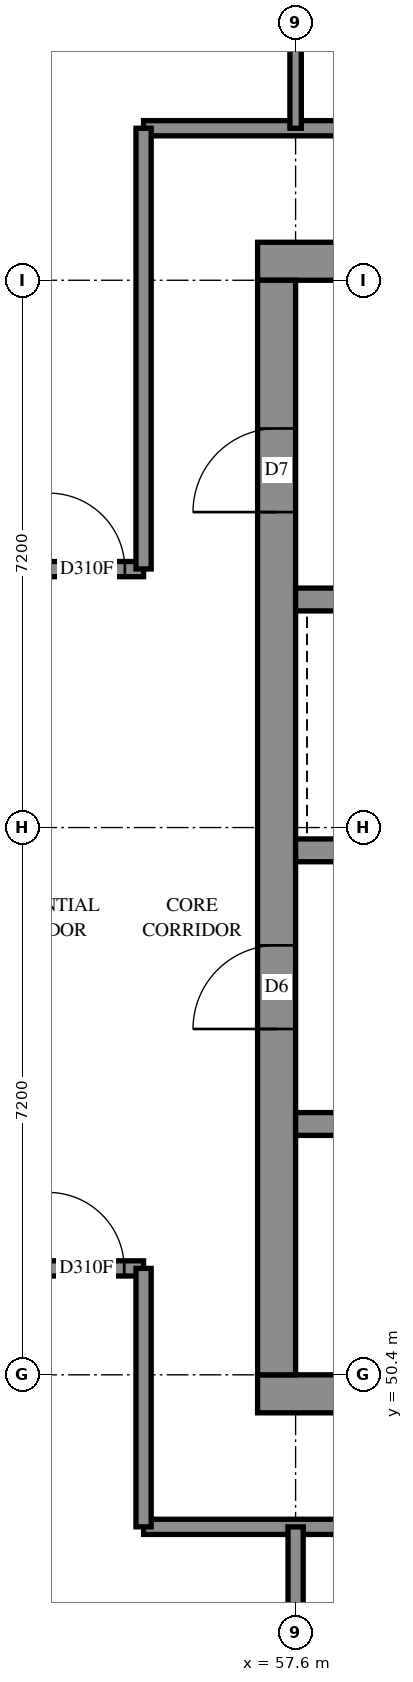
"""IFC4 building model, lengths in metres.
Left out: names, types, materials, properties, quantities, classifications, styles, units other than length and angle.
Written with IfcOpenShell. Run it as: python <this file> out.ifc"""

import sys

from ifc_helpers import new_model, si_unit, direction, frame, frame_2d, origin, place, context, subcontext, project, spatial, rectangle, extrude, element, fill, save


model = new_model("IFC4")
c1 = context("Model", 3, precision=1e-05, world=origin(), true_north=direction((0.0, 1.0)))
c2 = subcontext(c1, "Body", "Model", "MODEL_VIEW")
j1 = project(units=[si_unit("LENGTHUNIT", "METRE"), si_unit("PLANEANGLEUNIT", "RADIAN")], contexts=[c1])
p1 = place(None, origin())
s1 = spatial("IfcSite", under=j1, at=p1, CompositionType="ELEMENT")
p2 = place(p1, origin())
s2 = spatial("IfcBuilding", under=s1, at=p2, CompositionType="ELEMENT")
p3 = place(p2, frame((0.0, 0.0, 227.0)))
s3 = spatial("IfcBuildingStorey", under=s2, at=p3, CompositionType="ELEMENT", Elevation=227.0)
p4 = place(p3, frame((57.1, 50.15, -0.3), z_axis=(0.0, 0.0, 1.0), x_axis=(1.0, 0.0, 0.0)))
e1 = element("IfcWall", 1, at=p4, inside=s3, PredefinedType="SHEAR", context=c2, shape_type="SweptSolid", body=[
    extrude(rectangle(XDim=15.4, YDim=0.5, at=frame_2d((7.7, 0.0))), origin(), (0.0, 0.0, 1.0), 2.7),
])
p5 = place(p3, frame((57.1, 65.05, -0.3), z_axis=(0.0, 0.0, 1.0), x_axis=(1.0, 0.0, 0.0)))
e2 = element("IfcWall", 2, at=p5, inside=s3, PredefinedType="SHEAR", context=c2, shape_type="SweptSolid", body=[
    extrude(rectangle(XDim=15.4, YDim=0.5, at=frame_2d((7.7, 0.0))), origin(), (0.0, 0.0, 1.0), 2.7),
])
p6 = place(p5, frame((10.5, 0.0, 0.3)))
e3 = element("IfcOpeningElement", 3, at=p6, cuts=e2, PredefinedType="OPENING", context=c2, shape_type="SweptSolid", body=[
    extrude(rectangle(XDim=0.8, YDim=2.1, at=frame_2d((0.4, 1.05))), frame((0.0, 0.26, 0.0), z_axis=(0.0, -1.0, 0.0), x_axis=(1.0, 0.0, 0.0)), (0.0, 0.0, 1.0), 0.52),
])
p7 = place(p3, frame((57.35, 50.4, -0.3), z_axis=(0.0, 0.0, 1.0), x_axis=(0.0, 1.0, 0.0)))
e4 = element("IfcWall", 4, at=p7, inside=s3, PredefinedType="SHEAR", context=c2, shape_type="SweptSolid", body=[
    extrude(rectangle(XDim=14.4, YDim=0.5, at=frame_2d((7.2, 0.0))), origin(), (0.0, 0.0, 1.0), 2.7),
])
p8 = place(p7, frame((4.55, 0.0, 0.3)))
e5 = element("IfcOpeningElement", 5, at=p8, cuts=e4, PredefinedType="OPENING", context=c2, shape_type="SweptSolid", body=[
    extrude(rectangle(XDim=1.1, YDim=2.1, at=frame_2d((0.55, 1.05))), frame((0.0, 0.26, 0.0), z_axis=(0.0, -1.0, 0.0), x_axis=(1.0, 0.0, 0.0)), (0.0, 0.0, 1.0), 0.52),
])
p9 = place(p7, frame((11.35, 0.0, 0.3)))
e6 = element("IfcOpeningElement", 6, at=p9, cuts=e4, PredefinedType="OPENING", context=c2, shape_type="SweptSolid", body=[
    extrude(rectangle(XDim=1.1, YDim=2.1, at=frame_2d((0.55, 1.05))), frame((0.0, 0.26, 0.0), z_axis=(0.0, -1.0, 0.0), x_axis=(1.0, 0.0, 0.0)), (0.0, 0.0, 1.0), 0.52),
])
p10 = place(p3, frame((57.6, 53.7, 0.0), z_axis=(0.0, 0.0, 1.0), x_axis=(1.0, 0.0, 0.0)))
e7 = element("IfcWall", 7, at=p10, inside=s3, PredefinedType="SOLIDWALL", context=c2, shape_type="SweptSolid", body=[
    extrude(rectangle(XDim=14.4, YDim=0.3, at=frame_2d((7.2, 0.0))), origin(), (0.0, 0.0, 1.0), 3.1),
])
p11 = place(p10, frame((1.35, 0.0, 0.0)))
e8 = element("IfcOpeningElement", 8, at=p11, cuts=e7, PredefinedType="OPENING", context=c2, shape_type="SweptSolid", body=[
    extrude(rectangle(XDim=0.9, YDim=2.1, at=frame_2d((0.45, 1.05))), frame((0.0, 0.16, 0.0), z_axis=(0.0, -1.0, 0.0), x_axis=(1.0, 0.0, 0.0)), (0.0, 0.0, 1.0), 0.32),
])
p12 = place(p10, frame((4.95, 0.0, 0.0)))
e9 = element("IfcOpeningElement", 9, at=p12, cuts=e7, PredefinedType="OPENING", context=c2, shape_type="SweptSolid", body=[
    extrude(rectangle(XDim=0.9, YDim=2.1, at=frame_2d((0.45, 1.05))), frame((0.0, 0.16, 0.0), z_axis=(0.0, -1.0, 0.0), x_axis=(1.0, 0.0, 0.0)), (0.0, 0.0, 1.0), 0.32),
])
p13 = place(p10, frame((8.55, 0.0, 0.0)))
e10 = element("IfcOpeningElement", 10, at=p13, cuts=e7, PredefinedType="OPENING", context=c2, shape_type="SweptSolid", body=[
    extrude(rectangle(XDim=0.9, YDim=2.1, at=frame_2d((0.45, 1.05))), frame((0.0, 0.16, 0.0), z_axis=(0.0, -1.0, 0.0), x_axis=(1.0, 0.0, 0.0)), (0.0, 0.0, 1.0), 0.32),
])
p14 = place(p10, frame((12.05, 0.0, 0.0)))
e11 = element("IfcOpeningElement", 11, at=p14, cuts=e7, PredefinedType="OPENING", context=c2, shape_type="SweptSolid", body=[
    extrude(rectangle(XDim=1.1, YDim=2.1, at=frame_2d((0.55, 1.05))), frame((0.0, 0.16, 0.0), z_axis=(0.0, -1.0, 0.0), x_axis=(1.0, 0.0, 0.0)), (0.0, 0.0, 1.0), 0.32),
])
p15 = place(p3, frame((57.6, 57.3, 0.0), z_axis=(0.0, 0.0, 1.0), x_axis=(1.0, 0.0, 0.0)))
e12 = element("IfcWall", 12, at=p15, inside=s3, PredefinedType="SOLIDWALL", context=c2, shape_type="SweptSolid", body=[
    extrude(rectangle(XDim=14.4, YDim=0.3, at=frame_2d((7.2, 0.0))), origin(), (0.0, 0.0, 1.0), 3.1),
])
p16 = place(p15, frame((1.25, 0.0, 0.0)))
e13 = element("IfcOpeningElement", 13, at=p16, cuts=e12, PredefinedType="OPENING", context=c2, shape_type="SweptSolid", body=[
    extrude(rectangle(XDim=1.1, YDim=2.1, at=frame_2d((0.55, 1.05))), frame((0.0, 0.16, 0.0), z_axis=(0.0, -1.0, 0.0), x_axis=(1.0, 0.0, 0.0)), (0.0, 0.0, 1.0), 0.32),
])
p17 = place(p15, frame((4.85, 0.0, 0.0)))
e14 = element("IfcOpeningElement", 14, at=p17, cuts=e12, PredefinedType="OPENING", context=c2, shape_type="SweptSolid", body=[
    extrude(rectangle(XDim=1.1, YDim=2.1, at=frame_2d((0.55, 1.05))), frame((0.0, 0.16, 0.0), z_axis=(0.0, -1.0, 0.0), x_axis=(1.0, 0.0, 0.0)), (0.0, 0.0, 1.0), 0.32),
])
p18 = place(p15, frame((8.45, 0.0, 0.0)))
e15 = element("IfcOpeningElement", 15, at=p18, cuts=e12, PredefinedType="OPENING", context=c2, shape_type="SweptSolid", body=[
    extrude(rectangle(XDim=1.1, YDim=2.1, at=frame_2d((0.55, 1.05))), frame((0.0, 0.16, 0.0), z_axis=(0.0, -1.0, 0.0), x_axis=(1.0, 0.0, 0.0)), (0.0, 0.0, 1.0), 0.32),
])
p19 = place(p15, frame((12.05, 0.0, 0.0)))
e16 = element("IfcOpeningElement", 16, at=p19, cuts=e12, PredefinedType="OPENING", context=c2, shape_type="SweptSolid", body=[
    extrude(rectangle(XDim=1.1, YDim=2.1, at=frame_2d((0.55, 1.05))), frame((0.0, 0.16, 0.0), z_axis=(0.0, -1.0, 0.0), x_axis=(1.0, 0.0, 0.0)), (0.0, 0.0, 1.0), 0.32),
])
p20 = place(p3, frame((57.6, 60.6, 0.0), z_axis=(0.0, 0.0, 1.0), x_axis=(1.0, 0.0, 0.0)))
e17 = element("IfcWall", 17, at=p20, inside=s3, PredefinedType="SOLIDWALL", context=c2, shape_type="SweptSolid", body=[
    extrude(rectangle(XDim=7.2, YDim=0.3, at=frame_2d((3.6, 0.0))), origin(), (0.0, 0.0, 1.0), 3.1),
])
p21 = place(p3, frame((55.6, 48.4, 0.0), z_axis=(0.0, 0.0, 1.0), x_axis=(1.0, 0.0, 0.0)))
e18 = element("IfcWall", 18, at=p21, inside=s3, PredefinedType="PARTITIONING", context=c2, shape_type="SweptSolid", body=[
    extrude(rectangle(XDim=18.4, YDim=0.2, at=frame_2d((9.2, 0.0))), origin(), (0.0, 0.0, 1.0), 3.1),
])
p22 = place(p21, frame((5.862, 0.0, 0.0)))
e19 = element("IfcOpeningElement", 19, at=p22, cuts=e18, PredefinedType="OPENING", context=c2, shape_type="SweptSolid", body=[
    extrude(rectangle(XDim=1.0, YDim=2.1, at=frame_2d((0.5, 1.05))), frame((0.0, 0.11, 0.0), z_axis=(0.0, -1.0, 0.0), x_axis=(1.0, 0.0, 0.0)), (0.0, 0.0, 1.0), 0.22),
])
p23 = place(p21, frame((13.061, 0.0, 0.0)))
e20 = element("IfcOpeningElement", 20, at=p23, cuts=e18, PredefinedType="OPENING", context=c2, shape_type="SweptSolid", body=[
    extrude(rectangle(XDim=0.9, YDim=2.1, at=frame_2d((0.45, 1.05))), frame((0.0, 0.11, 0.0), z_axis=(0.0, -1.0, 0.0), x_axis=(1.0, 0.0, 0.0)), (0.0, 0.0, 1.0), 0.22),
])
p24 = place(p3, frame((55.6, 66.8, 0.0), z_axis=(0.0, 0.0, 1.0), x_axis=(1.0, 0.0, 0.0)))
e21 = element("IfcWall", 21, at=p24, inside=s3, PredefinedType="PARTITIONING", context=c2, shape_type="SweptSolid", body=[
    extrude(rectangle(XDim=18.4, YDim=0.2, at=frame_2d((9.2, 0.0))), origin(), (0.0, 0.0, 1.0), 3.1),
])
p25 = place(p24, frame((4.3, 0.0, 0.0)))
e22 = element("IfcOpeningElement", 22, at=p25, cuts=e21, PredefinedType="OPENING", context=c2, shape_type="SweptSolid", body=[
    extrude(rectangle(XDim=0.9, YDim=2.1, at=frame_2d((0.45, 1.05))), frame((0.0, 0.11, 0.0), z_axis=(0.0, -1.0, 0.0), x_axis=(1.0, 0.0, 0.0)), (0.0, 0.0, 1.0), 0.22),
])
p26 = place(p24, frame((6.0, 0.0, 0.0)))
e23 = element("IfcOpeningElement", 23, at=p26, cuts=e21, PredefinedType="OPENING", context=c2, shape_type="SweptSolid", body=[
    extrude(rectangle(XDim=0.9, YDim=2.1, at=frame_2d((0.45, 1.05))), frame((0.0, 0.11, 0.0), z_axis=(0.0, -1.0, 0.0), x_axis=(1.0, 0.0, 0.0)), (0.0, 0.0, 1.0), 0.22),
])
p27 = place(p24, frame((13.367, 0.0, 0.0)))
e24 = element("IfcOpeningElement", 24, at=p27, cuts=e21, PredefinedType="OPENING", context=c2, shape_type="SweptSolid", body=[
    extrude(rectangle(XDim=1.0, YDim=2.1, at=frame_2d((0.5, 1.05))), frame((0.0, 0.11, 0.0), z_axis=(0.0, -1.0, 0.0), x_axis=(1.0, 0.0, 0.0)), (0.0, 0.0, 1.0), 0.22),
])
p28 = place(p3, frame((40.602, 61.0, 0.0), z_axis=(0.0, 0.0, 1.0), x_axis=(1.0, 0.0, 0.0)))
e25 = element("IfcWall", 25, at=p28, inside=s3, PredefinedType="PARTITIONING", context=c2, shape_type="SweptSolid", body=[
    extrude(rectangle(XDim=14.998, YDim=0.2, at=frame_2d((7.499, 0.0))), origin(), (0.0, 0.0, 1.0), 3.1),
])
p29 = place(p28, frame((1.306, 0.0, 0.0)))
e26 = element("IfcOpeningElement", 26, at=p29, cuts=e25, PredefinedType="OPENING", context=c2, shape_type="SweptSolid", body=[
    extrude(rectangle(XDim=0.9, YDim=2.1, at=frame_2d((0.45, 1.05))), frame((0.0, 0.11, 0.0), z_axis=(0.0, -1.0, 0.0), x_axis=(1.0, 0.0, 0.0)), (0.0, 0.0, 1.0), 0.22),
])
p30 = place(p28, frame((6.598, 0.0, 0.0)))
e27 = element("IfcOpeningElement", 27, at=p30, cuts=e25, PredefinedType="OPENING", context=c2, shape_type="SweptSolid", body=[
    extrude(rectangle(XDim=0.9, YDim=2.1, at=frame_2d((0.45, 1.05))), frame((0.0, 0.11, 0.0), z_axis=(0.0, -1.0, 0.0), x_axis=(1.0, 0.0, 0.0)), (0.0, 0.0, 1.0), 0.22),
])
p31 = place(p28, frame((12.098, 0.0, 0.0)))
e28 = element("IfcOpeningElement", 28, at=p31, cuts=e25, PredefinedType="OPENING", context=c2, shape_type="SweptSolid", body=[
    extrude(rectangle(XDim=0.9, YDim=2.1, at=frame_2d((0.45, 1.05))), frame((0.0, 0.11, 0.0), z_axis=(0.0, -1.0, 0.0), x_axis=(1.0, 0.0, 0.0)), (0.0, 0.0, 1.0), 0.22),
])
p32 = place(p28, frame((13.752, 0.0, 0.0)))
e29 = element("IfcOpeningElement", 29, at=p32, cuts=e25, PredefinedType="OPENING", context=c2, shape_type="SweptSolid", body=[
    extrude(rectangle(XDim=1.0, YDim=2.1, at=frame_2d((0.5, 1.05))), frame((0.0, 0.11, 0.0), z_axis=(0.0, -1.0, 0.0), x_axis=(1.0, 0.0, 0.0)), (0.0, 0.0, 1.0), 0.22),
])
p33 = place(p3, frame((55.6, 61.002, 0.0), z_axis=(0.0, 0.0, 1.0), x_axis=(0.0, 1.0, 0.0)))
e30 = element("IfcWall", 30, at=p33, inside=s3, PredefinedType="PARTITIONING", context=c2, shape_type="SweptSolid", body=[
    extrude(rectangle(XDim=5.798, YDim=0.2, at=frame_2d((2.899, 0.0))), origin(), (0.0, 0.0, 1.0), 3.1),
])
p34 = place(p3, frame((50.4, 51.8, 0.0), z_axis=(0.0, 0.0, 1.0), x_axis=(1.0, 0.0, 0.0)))
e31 = element("IfcWall", 31, at=p34, inside=s3, PredefinedType="PARTITIONING", context=c2, shape_type="SweptSolid", body=[
    extrude(rectangle(XDim=5.2, YDim=0.2, at=frame_2d((2.6, 0.0))), origin(), (0.0, 0.0, 1.0), 3.1),
])
p35 = place(p34, frame((0.4, 0.0, 0.0)))
e32 = element("IfcOpeningElement", 32, at=p35, cuts=e31, PredefinedType="OPENING", context=c2, shape_type="SweptSolid", body=[
    extrude(rectangle(XDim=0.9, YDim=2.1, at=frame_2d((0.45, 1.05))), frame((0.0, 0.11, 0.0), z_axis=(0.0, -1.0, 0.0), x_axis=(1.0, 0.0, 0.0)), (0.0, 0.0, 1.0), 0.22),
])
p36 = place(p34, frame((3.946, 0.0, 0.0)))
e33 = element("IfcOpeningElement", 33, at=p36, cuts=e31, PredefinedType="OPENING", context=c2, shape_type="SweptSolid", body=[
    extrude(rectangle(XDim=1.0, YDim=2.1, at=frame_2d((0.5, 1.05))), frame((0.0, 0.11, 0.0), z_axis=(0.0, -1.0, 0.0), x_axis=(1.0, 0.0, 0.0)), (0.0, 0.0, 1.0), 0.22),
])
p37 = place(p3, frame((57.6, 43.6, 0.0), z_axis=(0.0, 0.0, 1.0), x_axis=(0.0, 1.0, 0.0)))
e34 = element("IfcWall", 34, at=p37, inside=s3, PredefinedType="PARTITIONING", context=c2, shape_type="SweptSolid", body=[
    extrude(rectangle(XDim=4.8, YDim=0.2, at=frame_2d((2.4, 0.0))), origin(), (0.0, 0.0, 1.0), 3.1),
])
p38 = place(p3, frame((55.6, 48.4, 0.0), z_axis=(0.0, 0.0, 1.0), x_axis=(0.0, 1.0, 0.0)))
e35 = element("IfcWall", 35, at=p38, inside=s3, PredefinedType="PARTITIONING", context=c2, shape_type="SweptSolid", body=[
    extrude(rectangle(XDim=3.4, YDim=0.2, at=frame_2d((1.7, 0.0))), origin(), (0.0, 0.0, 1.0), 3.1),
])
p39 = place(p3, frame((57.6, 66.8, 0.0), z_axis=(0.0, 0.0, 1.0), x_axis=(0.0, 1.0, 0.0)))
e36 = element("IfcWall", 36, at=p39, inside=s3, PredefinedType="PARTITIONING", context=c2, shape_type="SweptSolid", body=[
    extrude(rectangle(XDim=2.4, YDim=0.15, at=frame_2d((1.2, 0.0))), origin(), (0.0, 0.0, 1.0), 3.1),
])
p40 = place(p8, origin())
e37 = element("IfcDoor", 37, at=p40, inside=s3, OperationType="DOUBLE_DOOR_SINGLE_SWING", PredefinedType="DOOR", context=c2, shape_type="SweptSolid", body=[
    extrude(rectangle(XDim=1.1, YDim=2.1, at=frame_2d((0.55, 1.05))), frame((0.0, 0.025, 0.0), z_axis=(0.0, -1.0, 0.0), x_axis=(1.0, 0.0, 0.0)), (0.0, 0.0, 1.0), 0.05),
])
fill(e5, e37)
p41 = place(p9, origin())
e38 = element("IfcDoor", 38, at=p41, inside=s3, OperationType="SINGLE_SWING_LEFT", PredefinedType="DOOR", context=c2, shape_type="SweptSolid", body=[
    extrude(rectangle(XDim=1.1, YDim=2.1, at=frame_2d((0.55, 1.05))), frame((0.0, 0.025, 0.0), z_axis=(0.0, -1.0, 0.0), x_axis=(1.0, 0.0, 0.0)), (0.0, 0.0, 1.0), 0.05),
])
fill(e6, e38)
p42 = place(p36, origin())
e39 = element("IfcDoor", 39, at=p42, inside=s3, OperationType="SINGLE_SWING_RIGHT", PredefinedType="DOOR", context=c2, shape_type="SweptSolid", body=[
    extrude(rectangle(XDim=1.0, YDim=2.1, at=frame_2d((0.5, 1.05))), frame((0.0, 0.025, 0.0), z_axis=(0.0, -1.0, 0.0), x_axis=(1.0, 0.0, 0.0)), (0.0, 0.0, 1.0), 0.05),
])
fill(e33, e39)
p43 = place(p32, origin())
e40 = element("IfcDoor", 40, at=p43, inside=s3, OperationType="SINGLE_SWING_LEFT", PredefinedType="DOOR", context=c2, shape_type="SweptSolid", body=[
    extrude(rectangle(XDim=1.0, YDim=2.1, at=frame_2d((0.5, 1.05))), frame((0.0, 0.025, 0.0), z_axis=(0.0, -1.0, 0.0), x_axis=(1.0, 0.0, 0.0)), (0.0, 0.0, 1.0), 0.05),
])
fill(e29, e40)
save(model, sys.argv[1])
